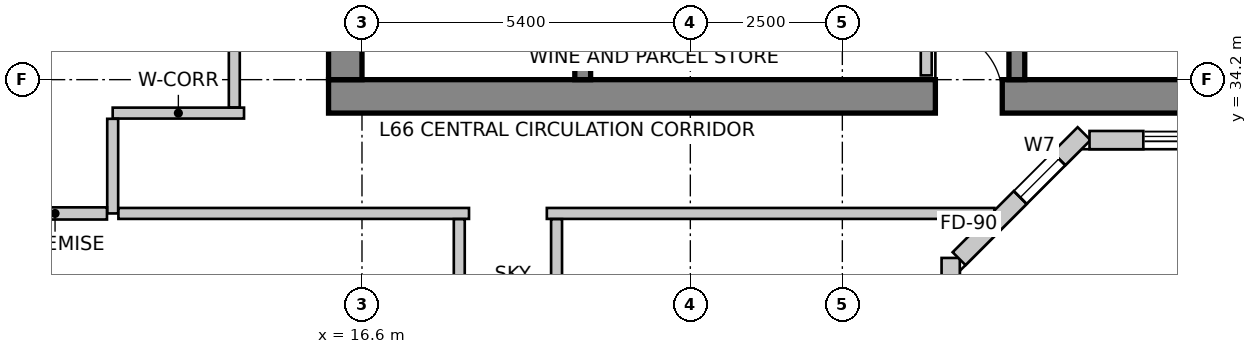
"""IFC4 building model, lengths in metres.
Left out: names, types, materials, properties, quantities, classifications, styles, units other than length and angle.
Written with IfcOpenShell. Run it as: python <this file> out.ifc"""

import sys

from ifc_helpers import new_model, si_unit, direction, frame, frame_2d, origin, place, context, subcontext, project, spatial, rectangle, extrude, source, transform, mapped, element, fill, save


model = new_model("IFC4")
c1 = context("Model", 3, precision=1e-05, world=origin(), true_north=direction((0.0, 1.0)))
c2 = subcontext(c1, "Body", "Model", "MODEL_VIEW")
j1 = project(units=[si_unit("LENGTHUNIT", "METRE"), si_unit("PLANEANGLEUNIT", "RADIAN")], contexts=[c1])
p1 = place(None, origin())
s1 = spatial("IfcSite", under=j1, at=p1, CompositionType="ELEMENT")
p2 = place(p1, origin())
s2 = spatial("IfcBuilding", under=s1, at=p2, CompositionType="ELEMENT")
p3 = place(p2, frame((0.0, 0.0, 260.1)))
s3 = spatial("IfcBuildingStorey", under=s2, at=p3, CompositionType="ELEMENT", Elevation=260.1)
p4 = place(p3, frame((16.05, 33.925, 0.0), z_axis=(0.0, 0.0, 1.0), x_axis=(1.0, 0.0, 0.0)))
e1 = element("IfcWall", 1, at=p4, inside=s3, PredefinedType="SHEAR", context=c2, shape_type="SweptSolid", body=[
    extrude(rectangle(XDim=15.5, YDim=0.55, at=frame_2d((7.75, 0.0))), origin(), (0.0, 0.0, 1.0), 3.6),
])
m1 = source(origin(), c2, "Body", "SweptSolid", [
    extrude(rectangle(XDim=1.1, YDim=2.15, at=frame_2d((0.55, 1.075))), frame((0.0, 0.285, 0.0), z_axis=(0.0, -1.0, 0.0), x_axis=(1.0, 0.0, 0.0)), (0.0, 0.0, 1.0), 0.57),
])
p5 = place(p4, frame((9.98, 0.0, 0.0)))
e2 = element("IfcOpeningElement", 2, at=p5, cuts=e1, PredefinedType="OPENING", context=c2, shape_type="MappedRepresentation", body=[
    mapped(m1, transform((0.0, 0.0, 0.0), scale=1.0)),
])
p6 = place(p3, frame((16.325, 34.2, 0.0), z_axis=(0.0, 0.0, 1.0), x_axis=(0.0, 1.0, 0.0)))
e3 = element("IfcWall", 3, at=p6, inside=s3, PredefinedType="SHEAR", context=c2, shape_type="SweptSolid", body=[
    extrude(rectangle(XDim=11.4, YDim=0.55, at=frame_2d((5.7, 0.0))), origin(), (0.0, 0.0, 1.0), 3.6),
])
p7 = place(p6, frame((7.15, 0.0, 0.0)))
e4 = element("IfcOpeningElement", 4, at=p7, cuts=e3, PredefinedType="OPENING", context=c2, shape_type="MappedRepresentation", body=[
    mapped(m1, transform((0.0, 0.0, 0.0), scale=1.0)),
])
p8 = place(p3, frame((20.23, 34.2, 0.0), z_axis=(0.0, 0.0, 1.0), x_axis=(0.0, 1.0, 0.0)))
e5 = element("IfcWall", 5, at=p8, inside=s3, PredefinedType="SHEAR", context=c2, shape_type="SweptSolid", body=[
    extrude(rectangle(XDim=9.06, YDim=0.26, at=frame_2d((4.53, 0.0))), origin(), (0.0, 0.0, 1.0), 3.6),
])
m2 = source(origin(), c2, "Body", "SweptSolid", [
    extrude(rectangle(XDim=1.1, YDim=2.15, at=frame_2d((0.55, 1.075))), frame((0.0, 0.14, 0.0), z_axis=(0.0, -1.0, 0.0), x_axis=(1.0, 0.0, 0.0)), (0.0, 0.0, 1.0), 0.28),
])
p9 = place(p8, frame((7.45, 0.0, 0.0)))
e6 = element("IfcOpeningElement", 6, at=p9, cuts=e5, PredefinedType="OPENING", context=c2, shape_type="MappedRepresentation", body=[
    mapped(m2, transform((0.0, 0.0, 0.0), scale=1.0)),
])
p10 = place(p3, frame((27.37, 34.2, 0.0), z_axis=(0.0, 0.0, 1.0), x_axis=(0.0, 1.0, 0.0)))
e7 = element("IfcWall", 7, at=p10, inside=s3, PredefinedType="SHEAR", context=c2, shape_type="SweptSolid", body=[
    extrude(rectangle(XDim=9.06, YDim=0.26, at=frame_2d((4.53, 0.0))), origin(), (0.0, 0.0, 1.0), 3.6),
])
p11 = place(p10, frame((7.45, 0.0, 0.0)))
e8 = element("IfcOpeningElement", 8, at=p11, cuts=e7, PredefinedType="OPENING", context=c2, shape_type="MappedRepresentation", body=[
    mapped(m2, transform((0.0, 0.0, 0.0), scale=1.0)),
])
p12 = place(p3, frame((26.282, 21.557, 0.0), z_axis=(0.0, 0.0, 1.0), x_axis=(0.0, 1.0, 0.0)))
e9 = element("IfcWall", 9, at=p12, inside=s3, PredefinedType="SOLIDWALL", context=c2, shape_type="SweptSolid", body=[
    extrude(rectangle(XDim=9.711, YDim=0.3, at=frame_2d((4.855, 0.0))), origin(), (0.0, 0.0, 1.0), 3.35),
])
m3 = source(origin(), c2, "Body", "SweptSolid", [
    extrude(rectangle(XDim=2.4, YDim=2.2, at=frame_2d((1.2, 1.1))), frame((0.0, 0.16, 0.0), z_axis=(0.0, -1.0, 0.0), x_axis=(1.0, 0.0, 0.0)), (0.0, 0.0, 1.0), 0.32),
])
p13 = place(p12, frame((1.388, 0.0, 0.85)))
e10 = element("IfcOpeningElement", 10, at=p13, cuts=e9, PredefinedType="OPENING", context=c2, shape_type="MappedRepresentation", body=[
    mapped(m3, transform((0.0, 0.0, 0.0), scale=1.0)),
])
m4 = source(origin(), c2, "Body", "SweptSolid", [
    extrude(rectangle(XDim=2.1, YDim=2.0, at=frame_2d((1.05, 1.0))), frame((0.0, 0.16, 0.0), z_axis=(0.0, -1.0, 0.0), x_axis=(1.0, 0.0, 0.0)), (0.0, 0.0, 1.0), 0.32),
])
p14 = place(p12, frame((6.073, 0.0, 0.85)))
e11 = element("IfcOpeningElement", 11, at=p14, cuts=e9, PredefinedType="OPENING", context=c2, shape_type="MappedRepresentation", body=[
    mapped(m4, transform((0.0, 0.0, 0.0), scale=1.0)),
])
p15 = place(p3, frame((26.42, 31.256, 0.0), z_axis=(0.0, 0.0, 1.0), x_axis=(0.707106781187, 0.707106781187, 0.0)))
e12 = element("IfcWall", 12, at=p15, inside=s3, PredefinedType="SOLIDWALL", context=c2, shape_type="SweptSolid", body=[
    extrude(rectangle(XDim=2.907, YDim=0.3, at=frame_2d((1.454, 0.0))), origin(), (0.0, 0.0, 1.0), 3.35),
])
m5 = source(origin(), c2, "Body", "SweptSolid", [
    extrude(rectangle(XDim=0.9, YDim=1.6, at=frame_2d((0.45, 0.8))), frame((0.0, 0.16, 0.0), z_axis=(0.0, -1.0, 0.0), x_axis=(1.0, 0.0, 0.0)), (0.0, 0.0, 1.0), 0.32),
])
p16 = place(p15, frame((1.422, 0.0, 0.85)))
e13 = element("IfcOpeningElement", 13, at=p16, cuts=e12, PredefinedType="OPENING", context=c2, shape_type="MappedRepresentation", body=[
    mapped(m5, transform((0.0, 0.0, 0.0), scale=1.0)),
])
p17 = place(p3, frame((28.565, 33.206, 0.0), z_axis=(0.0, 0.0, 1.0), x_axis=(1.0, 0.0, 0.0)))
e14 = element("IfcWall", 14, at=p17, inside=s3, PredefinedType="SOLIDWALL", context=c2, shape_type="SweptSolid", body=[
    extrude(rectangle(XDim=0.885, YDim=0.3, at=frame_2d((0.442, 0.0))), origin(), (0.0, 0.0, 1.0), 3.35),
])
p18 = place(p3, frame((13.269, 47.134, 0.0), z_axis=(0.0, 0.0, 1.0), x_axis=(-0.3199211297, -0.947444178182, 0.0)))
e15 = element("IfcWall", 15, at=p18, inside=s3, PredefinedType="SOLIDWALL", context=c2, shape_type="SweptSolid", body=[
    extrude(rectangle(XDim=16.132, YDim=0.3, at=frame_2d((8.066, 0.0))), origin(), (0.0, 0.0, 1.0), 3.35),
])
p19 = place(p18, frame((2.435, 0.0, 0.85)))
e16 = element("IfcOpeningElement", 16, at=p19, cuts=e15, PredefinedType="OPENING", context=c2, shape_type="MappedRepresentation", body=[
    mapped(m3, transform((0.0, 0.0, 0.0), scale=1.0)),
])
p20 = place(p18, frame((7.417, 0.0, 0.85)))
e17 = element("IfcOpeningElement", 17, at=p20, cuts=e15, PredefinedType="OPENING", context=c2, shape_type="MappedRepresentation", body=[
    mapped(m4, transform((0.0, 0.0, 0.0), scale=1.0)),
])
p21 = place(p18, frame((12.099, 0.0, 0.85)))
e18 = element("IfcOpeningElement", 18, at=p21, cuts=e15, PredefinedType="OPENING", context=c2, shape_type="MappedRepresentation", body=[
    mapped(m3, transform((0.0, 0.0, 0.0), scale=1.0)),
])
p22 = place(p3, frame((25.88, 35.956, 0.0), z_axis=(0.0, 0.0, 1.0), x_axis=(0.0, -1.0, 0.0)))
e19 = element("IfcWall", 19, at=p22, inside=s3, PredefinedType="PARTITIONING", context=c2, shape_type="SweptSolid", body=[
    extrude(rectangle(XDim=1.686, YDim=0.18, at=frame_2d((0.843, 0.0))), origin(), (0.0, 0.0, 1.0), 2.642),
])
p23 = place(p3, frame((12.5, 33.65, 0.0), z_axis=(0.0, 0.0, 1.0), x_axis=(1.0, 0.0, 0.0)))
e20 = element("IfcWall", 20, at=p23, inside=s3, PredefinedType="PARTITIONING", context=c2, shape_type="SweptSolid", body=[
    extrude(rectangle(XDim=2.16, YDim=0.18, at=frame_2d((1.08, 0.0))), origin(), (0.0, 0.0, 1.0), 3.35),
])
p24 = place(p3, frame((12.5, 32.0, 0.0), z_axis=(0.0, 0.0, 1.0), x_axis=(0.0, 1.0, 0.0)))
e21 = element("IfcWall", 21, at=p24, inside=s3, PredefinedType="PARTITIONING", context=c2, shape_type="SweptSolid", body=[
    extrude(rectangle(XDim=1.556, YDim=0.18, at=frame_2d((0.778, 0.0))), origin(), (0.0, 0.0, 1.0), 2.935),
])
p25 = place(p3, frame((18.36, 32.0, 0.0), z_axis=(0.0, 0.0, 1.0), x_axis=(-1.0, 0.0, 0.0)))
e22 = element("IfcWall", 22, at=p25, inside=s3, PredefinedType="PARTITIONING", context=c2, shape_type="SweptSolid", body=[
    extrude(rectangle(XDim=5.766, YDim=0.18, at=frame_2d((2.883, 0.0))), origin(), (0.0, 0.0, 1.0), 2.935),
])
p26 = place(p3, frame((27.001, 32.0, 0.0), z_axis=(0.0, 0.0, 1.0), x_axis=(-1.0, 0.0, 0.0)))
e23 = element("IfcWall", 23, at=p26, inside=s3, PredefinedType="PARTITIONING", context=c2, shape_type="SweptSolid", body=[
    extrude(rectangle(XDim=7.361, YDim=0.18, at=frame_2d((3.681, 0.0))), origin(), (0.0, 0.0, 1.0), 2.935),
])
p27 = place(p3, frame((14.5, 33.744, 0.0), z_axis=(0.0, 0.0, 1.0), x_axis=(0.0, 1.0, 0.0)))
e24 = element("IfcWall", 24, at=p27, inside=s3, PredefinedType="PARTITIONING", context=c2, shape_type="SweptSolid", body=[
    extrude(rectangle(XDim=12.406, YDim=0.18, at=frame_2d((6.203, 0.0))), origin(), (0.0, 0.0, 1.0), 3.35),
])
m6 = source(origin(), c2, "Body", "SweptSolid", [
    extrude(rectangle(XDim=0.9, YDim=2.15, at=frame_2d((0.45, 1.075))), frame((0.0, 0.1, 0.0), z_axis=(0.0, -1.0, 0.0), x_axis=(1.0, 0.0, 0.0)), (0.0, 0.0, 1.0), 0.2),
])
p28 = place(p27, frame((4.37, 0.0, 0.0)))
e25 = element("IfcOpeningElement", 25, at=p28, cuts=e24, PredefinedType="OPENING", context=c2, shape_type="MappedRepresentation", body=[
    mapped(m6, transform((0.0, 0.0, 0.0), scale=1.0)),
])
p29 = place(p3, frame((12.406, 32.0, 0.0), z_axis=(0.0, 0.0, 1.0), x_axis=(-1.0, 0.0, 0.0)))
e26 = element("IfcWall", 26, at=p29, inside=s3, PredefinedType="PARTITIONING", context=c2, shape_type="SweptSolid", body=[
    extrude(rectangle(XDim=1.708, YDim=0.2, at=frame_2d((0.854, 0.0))), origin(), (0.0, 0.0, 1.0), 2.642),
])
p30 = place(p3, frame((18.2, 24.872, 0.0), z_axis=(0.0, 0.0, 1.0), x_axis=(0.0, 1.0, 0.0)))
e27 = element("IfcWall", 27, at=p30, inside=s3, PredefinedType="PARTITIONING", context=c2, shape_type="SweptSolid", body=[
    extrude(rectangle(XDim=7.034, YDim=0.18, at=frame_2d((3.517, 0.0))), origin(), (0.0, 0.0, 1.0), 2.788),
])
p31 = place(p30, frame((3.067, 0.0, 0.0)))
e28 = element("IfcOpeningElement", 28, at=p31, cuts=e27, PredefinedType="OPENING", context=c2, shape_type="MappedRepresentation", body=[
    mapped(m6, transform((0.0, 0.0, 0.0), scale=1.0)),
])
p32 = place(p3, frame((19.8, 31.906, 0.0), z_axis=(0.0, 0.0, 1.0), x_axis=(0.0, -1.0, 0.0)))
e29 = element("IfcWall", 29, at=p32, inside=s3, PredefinedType="PARTITIONING", context=c2, shape_type="SweptSolid", body=[
    extrude(rectangle(XDim=10.841, YDim=0.18, at=frame_2d((5.42, 0.0))), origin(), (0.0, 0.0, 1.0), 2.788),
])
p33 = place(p32, frame((4.97, 0.0, 0.0)))
e30 = element("IfcOpeningElement", 30, at=p33, cuts=e29, PredefinedType="OPENING", context=c2, shape_type="MappedRepresentation", body=[
    mapped(m6, transform((0.0, 0.0, 0.0), scale=1.0)),
])
m7 = source(origin(), c2, "Body", "SweptSolid", [
    extrude(rectangle(XDim=0.9, YDim=1.6, at=frame_2d((0.45, 0.8))), frame((0.0, -0.015, 0.0), z_axis=(0.0, -1.0, 0.0), x_axis=(1.0, 0.0, 0.0)), (0.0, 0.0, 1.0), 0.06),
])
p34 = place(p16, origin())
e31 = element("IfcWindow", 31, at=p34, inside=s3, PartitioningType="SINGLE_PANEL", PredefinedType="WINDOW", context=c2, shape_type="MappedRepresentation", body=[
    mapped(m7, transform((0.0, 0.0, 0.0), scale=1.0)),
])
fill(e13, e31)
m8 = source(origin(), c2, "Body", "SweptSolid", [
    extrude(rectangle(XDim=1.1, YDim=2.15, at=frame_2d((0.55, 1.075))), frame((0.0, 0.025, 0.0), z_axis=(0.0, -1.0, 0.0), x_axis=(1.0, 0.0, 0.0)), (0.0, 0.0, 1.0), 0.05),
])
p35 = place(p5, origin())
e32 = element("IfcDoor", 32, at=p35, inside=s3, OperationType="SINGLE_SWING_LEFT", PredefinedType="DOOR", context=c2, shape_type="MappedRepresentation", body=[
    mapped(m8, transform((0.0, 0.0, 0.0), scale=1.0)),
])
fill(e2, e32)
save(model, sys.argv[1])
